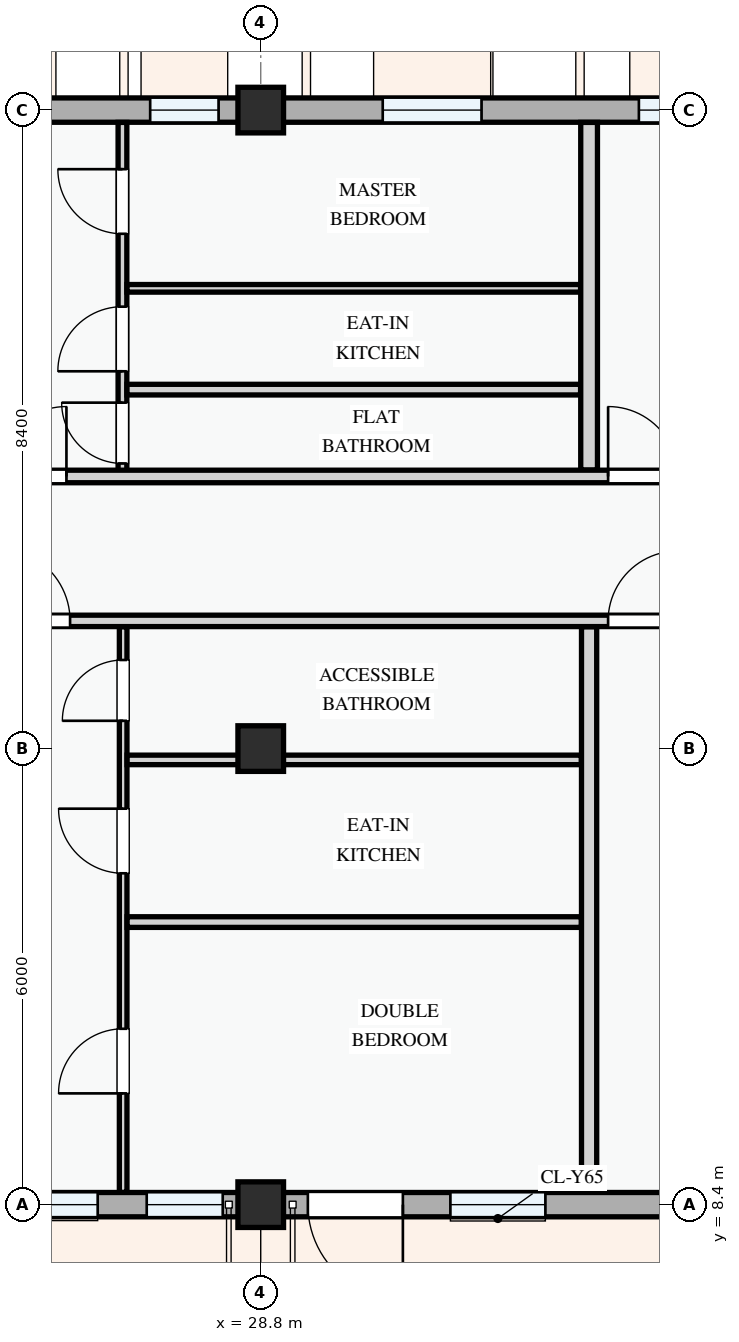
"""IFC4 building model, lengths in metres.
Left out: names, types, materials, properties, quantities, classifications, styles, units other than length and angle.
Written with IfcOpenShell. Run it as: python <this file> out.ifc"""

import sys

from ifc_helpers import new_model, si_unit, direction, frame, frame_2d, origin, origin_2d, place, context, subcontext, project, spatial, rectangle, extrude, element, fill, save


model = new_model("IFC4")
c1 = context("Model", 3, precision=1e-05, world=origin(), true_north=direction((0.0, 1.0)))
c2 = subcontext(c1, "Body", "Model", "MODEL_VIEW")
j1 = project(units=[si_unit("LENGTHUNIT", "METRE"), si_unit("PLANEANGLEUNIT", "RADIAN")], contexts=[c1])
p1 = place(None, origin())
s1 = spatial("IfcSite", under=j1, at=p1, CompositionType="ELEMENT")
p2 = place(p1, origin())
s2 = spatial("IfcBuilding", under=s1, at=p2, CompositionType="ELEMENT")
p3 = place(p2, frame((0.0, 0.0, 14.7)))
s3 = spatial("IfcBuildingStorey", under=s2, at=p3, CompositionType="ELEMENT", Elevation=14.7)
for number, where, z_axis, x_axis in (
    (1, (28.8, 8.4, 0.0), (0.0, 0.0, 1.0), (1.0, 0.0, 0.0)),
    (2, (28.8, 14.4, 0.0), (0.0, 0.0, 1.0), (1.0, 0.0, 0.0)),
    (3, (28.8, 22.8, 0.0), (0.0, 0.0, 1.0), (1.0, 0.0, 0.0)),
):
    element("IfcColumn", number, at=place(p3, frame(where, z_axis=z_axis, x_axis=x_axis)), inside=s3, PredefinedType="COLUMN", context=c2, shape_type="SweptSolid", body=[
        extrude(rectangle(XDim=0.6, YDim=0.6, at=origin_2d()), origin(), (0.0, 0.0, 1.0), 3.3),
    ])
p4 = place(p3, frame((22.8, 8.4, 0.0), z_axis=(0.0, 0.0, 1.0), x_axis=(1.0, 0.0, 0.0)))
e4 = element("IfcWall", 4, at=p4, inside=s3, PredefinedType="STANDARD", context=c2, shape_type="SweptSolid", body=[
    extrude(rectangle(XDim=6.0, YDim=0.32, at=frame_2d((3.0, 0.0))), origin(), (0.0, 0.0, 1.0), 2.475),
])
p5 = place(p4, frame((0.62, 0.0, 0.0)))
e5 = element("IfcOpeningElement", 5, at=p5, cuts=e4, PredefinedType="OPENING", context=c2, shape_type="SweptSolid", body=[
    extrude(rectangle(XDim=1.2, YDim=2.15, at=frame_2d((0.6, 1.075))), frame((0.0, 0.17, 0.0), z_axis=(0.0, -1.0, 0.0), x_axis=(1.0, 0.0, 0.0)), (0.0, 0.0, 1.0), 0.34),
])
p6 = place(p4, frame((2.205, 0.0, 0.78)))
e6 = element("IfcOpeningElement", 6, at=p6, cuts=e4, PredefinedType="OPENING", context=c2, shape_type="SweptSolid", body=[
    extrude(rectangle(XDim=1.65, YDim=1.5, at=frame_2d((0.825, 0.75))), frame((0.0, 0.17, 0.0), z_axis=(0.0, -1.0, 0.0), x_axis=(1.0, 0.0, 0.0)), (0.0, 0.0, 1.0), 0.34),
])
p7 = place(p4, frame((4.5, 0.0, 0.78)))
e7 = element("IfcOpeningElement", 7, at=p7, cuts=e4, PredefinedType="OPENING", context=c2, shape_type="SweptSolid", body=[
    extrude(rectangle(XDim=1.0, YDim=1.25, at=frame_2d((0.5, 0.625))), frame((0.0, 0.17, 0.0), z_axis=(0.0, -1.0, 0.0), x_axis=(1.0, 0.0, 0.0)), (0.0, 0.0, 1.0), 0.34),
])
p8 = place(p3, frame((28.8, 8.4, 0.0), z_axis=(0.0, 0.0, 1.0), x_axis=(1.0, 0.0, 0.0)))
e8 = element("IfcWall", 8, at=p8, inside=s3, PredefinedType="STANDARD", context=c2, shape_type="SweptSolid", body=[
    extrude(rectangle(XDim=8.4, YDim=0.32, at=frame_2d((4.2, 0.0))), origin(), (0.0, 0.0, 1.0), 2.375),
])
p9 = place(p8, frame((0.62, 0.0, 0.0)))
e9 = element("IfcOpeningElement", 9, at=p9, cuts=e8, PredefinedType="OPENING", context=c2, shape_type="SweptSolid", body=[
    extrude(rectangle(XDim=1.25, YDim=2.2, at=frame_2d((0.625, 1.1))), frame((0.0, 0.17, 0.0), z_axis=(0.0, -1.0, 0.0), x_axis=(1.0, 0.0, 0.0)), (0.0, 0.0, 1.0), 0.34),
])
p10 = place(p8, frame((2.495, 0.0, 0.78)))
e10 = element("IfcOpeningElement", 10, at=p10, cuts=e8, PredefinedType="OPENING", context=c2, shape_type="SweptSolid", body=[
    extrude(rectangle(XDim=1.25, YDim=1.3, at=frame_2d((0.625, 0.65))), frame((0.0, 0.17, 0.0), z_axis=(0.0, -1.0, 0.0), x_axis=(1.0, 0.0, 0.0)), (0.0, 0.0, 1.0), 0.34),
])
p11 = place(p8, frame((5.49, 0.0, 0.78)))
e11 = element("IfcOpeningElement", 11, at=p11, cuts=e8, PredefinedType="OPENING", context=c2, shape_type="SweptSolid", body=[
    extrude(rectangle(XDim=1.55, YDim=1.4, at=frame_2d((0.775, 0.7))), frame((0.0, 0.17, 0.0), z_axis=(0.0, -1.0, 0.0), x_axis=(1.0, 0.0, 0.0)), (0.0, 0.0, 1.0), 0.34),
])
p12 = place(p3, frame((37.2, 22.8, 0.0), z_axis=(0.0, 0.0, 1.0), x_axis=(-1.0, 0.0, 0.0)))
e12 = element("IfcWall", 12, at=p12, inside=s3, PredefinedType="STANDARD", context=c2, shape_type="SweptSolid", body=[
    extrude(rectangle(XDim=8.4, YDim=0.32, at=frame_2d((4.2, 0.0))), origin(), (0.0, 0.0, 1.0), 2.375),
])
p13 = place(p12, frame((0.845, 0.0, 0.78)))
e13 = element("IfcOpeningElement", 13, at=p13, cuts=e12, PredefinedType="OPENING", context=c2, shape_type="SweptSolid", body=[
    extrude(rectangle(XDim=2.58, YDim=1.48, at=frame_2d((1.29, 0.74))), frame((0.0, 0.17, 0.0), z_axis=(0.0, -1.0, 0.0), x_axis=(1.0, 0.0, 0.0)), (0.0, 0.0, 1.0), 0.34),
])
p14 = place(p12, frame((5.495, 0.0, 0.78)))
e14 = element("IfcOpeningElement", 14, at=p14, cuts=e12, PredefinedType="OPENING", context=c2, shape_type="SweptSolid", body=[
    extrude(rectangle(XDim=1.3, YDim=1.4, at=frame_2d((0.65, 0.7))), frame((0.0, 0.17, 0.0), z_axis=(0.0, -1.0, 0.0), x_axis=(1.0, 0.0, 0.0)), (0.0, 0.0, 1.0), 0.34),
])
p15 = place(p3, frame((28.8, 22.8, 0.0), z_axis=(0.0, 0.0, 1.0), x_axis=(-1.0, 0.0, 0.0)))
e15 = element("IfcWall", 15, at=p15, inside=s3, PredefinedType="STANDARD", context=c2, shape_type="SweptSolid", body=[
    extrude(rectangle(XDim=6.0, YDim=0.32, at=frame_2d((3.0, 0.0))), origin(), (0.0, 0.0, 1.0), 2.475),
])
p16 = place(p15, frame((0.555, 0.0, 0.78)))
e16 = element("IfcOpeningElement", 16, at=p16, cuts=e15, PredefinedType="OPENING", context=c2, shape_type="SweptSolid", body=[
    extrude(rectangle(XDim=0.9, YDim=1.2, at=frame_2d((0.45, 0.6))), frame((0.0, 0.17, 0.0), z_axis=(0.0, -1.0, 0.0), x_axis=(1.0, 0.0, 0.0)), (0.0, 0.0, 1.0), 0.34),
])
p17 = place(p15, frame((2.815, 0.0, 0.78)))
e17 = element("IfcOpeningElement", 17, at=p17, cuts=e15, PredefinedType="OPENING", context=c2, shape_type="SweptSolid", body=[
    extrude(rectangle(XDim=2.0, YDim=1.5, at=frame_2d((1.0, 0.75))), frame((0.0, 0.17, 0.0), z_axis=(0.0, -1.0, 0.0), x_axis=(1.0, 0.0, 0.0)), (0.0, 0.0, 1.0), 0.34),
])
p18 = place(p3, frame((26.99, 8.562, 0.0), z_axis=(0.0, 0.0, 1.0), x_axis=(0.0, 1.0, 0.0)))
e18 = element("IfcWall", 18, at=p18, inside=s3, PredefinedType="PARTITIONING", context=c2, shape_type="SweptSolid", body=[
    extrude(rectangle(XDim=7.441, YDim=0.1, at=frame_2d((3.72, 0.0))), origin(), (0.0, 0.0, 1.0), 3.0),
])
p19 = place(p18, frame((1.302, 0.0, 0.0)))
e19 = element("IfcOpeningElement", 19, at=p19, cuts=e18, PredefinedType="OPENING", context=c2, shape_type="SweptSolid", body=[
    extrude(rectangle(XDim=0.85, YDim=2.1, at=frame_2d((0.425, 1.05))), frame((0.0, 0.06, 0.0), z_axis=(0.0, -1.0, 0.0), x_axis=(1.0, 0.0, 0.0)), (0.0, 0.0, 1.0), 0.12),
])
p20 = place(p18, frame((4.198, 0.0, 0.0)))
e20 = element("IfcOpeningElement", 20, at=p20, cuts=e18, PredefinedType="OPENING", context=c2, shape_type="SweptSolid", body=[
    extrude(rectangle(XDim=0.85, YDim=2.1, at=frame_2d((0.425, 1.05))), frame((0.0, 0.06, 0.0), z_axis=(0.0, -1.0, 0.0), x_axis=(1.0, 0.0, 0.0)), (0.0, 0.0, 1.0), 0.12),
])
p21 = place(p18, frame((6.204, 0.0, 0.0)))
e21 = element("IfcOpeningElement", 21, at=p21, cuts=e18, PredefinedType="OPENING", context=c2, shape_type="SweptSolid", body=[
    extrude(rectangle(XDim=0.8, YDim=2.1, at=frame_2d((0.4, 1.05))), frame((0.0, 0.06, 0.0), z_axis=(0.0, -1.0, 0.0), x_axis=(1.0, 0.0, 0.0)), (0.0, 0.0, 1.0), 0.12),
])
p22 = place(p3, frame((27.042, 12.118, 0.0), z_axis=(0.0, 0.0, 1.0), x_axis=(1.0, 0.0, 0.0)))
e22 = element("IfcWall", 22, at=p22, inside=s3, PredefinedType="PARTITIONING", context=c2, shape_type="SweptSolid", body=[
    extrude(rectangle(XDim=5.976, YDim=0.14, at=frame_2d((2.988, 0.0))), origin(), (0.0, 0.0, 1.0), 3.0),
])
p23 = place(p3, frame((27.042, 14.251, 0.0), z_axis=(0.0, 0.0, 1.0), x_axis=(1.0, 0.0, 0.0)))
e23 = element("IfcWall", 23, at=p23, inside=s3, PredefinedType="PARTITIONING", context=c2, shape_type="SweptSolid", body=[
    extrude(rectangle(XDim=5.976, YDim=0.125, at=frame_2d((2.988, 0.0))), origin(), (0.0, 0.0, 1.0), 2.375),
])
p24 = place(p3, frame((26.981, 17.98, 0.0), z_axis=(0.0, 0.0, 1.0), x_axis=(0.0, 1.0, 0.0)))
e24 = element("IfcWall", 24, at=p24, inside=s3, PredefinedType="PARTITIONING", context=c2, shape_type="SweptSolid", body=[
    extrude(rectangle(XDim=4.658, YDim=0.115, at=frame_2d((2.329, 0.0))), origin(), (0.0, 0.0, 1.0), 3.0),
])
p25 = place(p24, frame((0.171, 0.0, 0.0)))
e25 = element("IfcOpeningElement", 25, at=p25, cuts=e24, PredefinedType="OPENING", context=c2, shape_type="SweptSolid", body=[
    extrude(rectangle(XDim=0.8, YDim=2.1, at=frame_2d((0.4, 1.05))), frame((0.0, 0.067, 0.0), z_axis=(0.0, -1.0, 0.0), x_axis=(1.0, 0.0, 0.0)), (0.0, 0.0, 1.0), 0.135),
])
p26 = place(p24, frame((1.384, 0.0, 0.0)))
e26 = element("IfcOpeningElement", 26, at=p26, cuts=e24, PredefinedType="OPENING", context=c2, shape_type="SweptSolid", body=[
    extrude(rectangle(XDim=0.85, YDim=2.1, at=frame_2d((0.425, 1.05))), frame((0.0, 0.067, 0.0), z_axis=(0.0, -1.0, 0.0), x_axis=(1.0, 0.0, 0.0)), (0.0, 0.0, 1.0), 0.135),
])
p27 = place(p24, frame((3.193, 0.0, 0.0)))
e27 = element("IfcOpeningElement", 27, at=p27, cuts=e24, PredefinedType="OPENING", context=c2, shape_type="SweptSolid", body=[
    extrude(rectangle(XDim=0.85, YDim=2.1, at=frame_2d((0.425, 1.05))), frame((0.0, 0.067, 0.0), z_axis=(0.0, -1.0, 0.0), x_axis=(1.0, 0.0, 0.0)), (0.0, 0.0, 1.0), 0.135),
])
p28 = place(p3, frame((27.04, 20.455, 0.0), z_axis=(0.0, 0.0, 1.0), x_axis=(1.0, 0.0, 0.0)))
e28 = element("IfcWall", 28, at=p28, inside=s3, PredefinedType="PARTITIONING", context=c2, shape_type="SweptSolid", body=[
    extrude(rectangle(XDim=5.968, YDim=0.1, at=frame_2d((2.984, 0.0))), origin(), (0.0, 0.0, 1.0), 3.0),
])
p29 = place(p3, frame((27.04, 19.122, 0.0), z_axis=(0.0, 0.0, 1.0), x_axis=(1.0, 0.0, 0.0)))
e29 = element("IfcWall", 29, at=p29, inside=s3, PredefinedType="PARTITIONING", context=c2, shape_type="SweptSolid", body=[
    extrude(rectangle(XDim=5.968, YDim=0.14, at=frame_2d((2.984, 0.0))), origin(), (0.0, 0.0, 1.0), 3.0),
])
p30 = place(p3, frame((33.12, 8.562, 0.0), z_axis=(0.0, 0.0, 1.0), x_axis=(0.0, 1.0, 0.0)))
e30 = element("IfcWall", 30, at=p30, inside=s3, PredefinedType="PARTITIONING", context=c2, shape_type="SweptSolid", body=[
    extrude(rectangle(XDim=7.441, YDim=0.2, at=frame_2d((3.72, 0.0))), origin(), (0.0, 0.0, 1.0), 2.585),
])
p31 = place(p3, frame((33.12, 18.064, 0.0), z_axis=(0.0, 0.0, 1.0), x_axis=(0.0, 1.0, 0.0)))
e31 = element("IfcWall", 31, at=p31, inside=s3, PredefinedType="PARTITIONING", context=c2, shape_type="SweptSolid", body=[
    extrude(rectangle(XDim=4.573, YDim=0.22, at=frame_2d((2.287, 0.0))), origin(), (0.0, 0.0, 1.0), 2.585),
])
p32 = place(p3, frame((22.66, 16.08, 0.0), z_axis=(0.0, 0.0, 1.0), x_axis=(1.0, 0.0, 0.0)))
e32 = element("IfcWall", 32, at=p32, inside=s3, PredefinedType="PARTITIONING", context=c2, shape_type="SweptSolid", body=[
    extrude(rectangle(XDim=34.778, YDim=0.15, at=frame_2d((17.389, 0.0))), origin(), (0.0, 0.0, 1.0), 3.0),
])
p33 = place(p32, frame((2.672, 0.0, 0.0)))
e33 = element("IfcOpeningElement", 33, at=p33, cuts=e32, PredefinedType="OPENING", context=c2, shape_type="SweptSolid", body=[
    extrude(rectangle(XDim=0.96, YDim=2.12, at=frame_2d((0.48, 1.06))), frame((0.0, 0.085, 0.0), z_axis=(0.0, -1.0, 0.0), x_axis=(1.0, 0.0, 0.0)), (0.0, 0.0, 1.0), 0.17),
])
p34 = place(p32, frame((10.71, 0.0, 0.0)))
e34 = element("IfcOpeningElement", 34, at=p34, cuts=e32, PredefinedType="OPENING", context=c2, shape_type="SweptSolid", body=[
    extrude(rectangle(XDim=0.92, YDim=2.1, at=frame_2d((0.46, 1.05))), frame((0.0, 0.085, 0.0), z_axis=(0.0, -1.0, 0.0), x_axis=(1.0, 0.0, 0.0)), (0.0, 0.0, 1.0), 0.17),
])
p35 = place(p32, frame((24.28, 0.0, 0.0)))
e35 = element("IfcOpeningElement", 35, at=p35, cuts=e32, PredefinedType="OPENING", context=c2, shape_type="SweptSolid", body=[
    extrude(rectangle(XDim=0.92, YDim=2.1, at=frame_2d((0.46, 1.05))), frame((0.0, 0.085, 0.0), z_axis=(0.0, -1.0, 0.0), x_axis=(1.0, 0.0, 0.0)), (0.0, 0.0, 1.0), 0.17),
])
p36 = place(p3, frame((22.66, 17.98, 0.0), z_axis=(0.0, 0.0, 1.0), x_axis=(1.0, 0.0, 0.0)))
e36 = element("IfcWall", 36, at=p36, inside=s3, PredefinedType="PARTITIONING", context=c2, shape_type="SweptSolid", body=[
    extrude(rectangle(XDim=34.778, YDim=0.165, at=frame_2d((17.389, 0.0))), origin(), (0.0, 0.0, 1.0), 3.0),
])
p37 = place(p36, frame((2.664, 0.0, 0.0)))
e37 = element("IfcOpeningElement", 37, at=p37, cuts=e36, PredefinedType="OPENING", context=c2, shape_type="SweptSolid", body=[
    extrude(rectangle(XDim=0.92, YDim=2.1, at=frame_2d((0.46, 1.05))), frame((0.0, 0.093, 0.0), z_axis=(0.0, -1.0, 0.0), x_axis=(1.0, 0.0, 0.0)), (0.0, 0.0, 1.0), 0.185),
])
p38 = place(p36, frame((10.71, 0.0, 0.0)))
e38 = element("IfcOpeningElement", 38, at=p38, cuts=e36, PredefinedType="OPENING", context=c2, shape_type="SweptSolid", body=[
    extrude(rectangle(XDim=0.92, YDim=2.1, at=frame_2d((0.46, 1.05))), frame((0.0, 0.093, 0.0), z_axis=(0.0, -1.0, 0.0), x_axis=(1.0, 0.0, 0.0)), (0.0, 0.0, 1.0), 0.185),
])
p39 = place(p36, frame((24.254, 0.0, 0.0)))
e39 = element("IfcOpeningElement", 39, at=p39, cuts=e36, PredefinedType="OPENING", context=c2, shape_type="SweptSolid", body=[
    extrude(rectangle(XDim=0.96, YDim=2.12, at=frame_2d((0.48, 1.06))), frame((0.0, 0.093, 0.0), z_axis=(0.0, -1.0, 0.0), x_axis=(1.0, 0.0, 0.0)), (0.0, 0.0, 1.0), 0.185),
])
p40 = place(p6, origin())
e40 = element("IfcWindow", 40, at=p40, inside=s3, PartitioningType="DOUBLE_PANEL_VERTICAL", PredefinedType="WINDOW", context=c2, shape_type="SweptSolid", body=[
    extrude(rectangle(XDim=1.65, YDim=1.5, at=frame_2d((0.825, 0.75))), frame((0.0, 0.03, 0.0), z_axis=(0.0, -1.0, 0.0), x_axis=(1.0, 0.0, 0.0)), (0.0, 0.0, 1.0), 0.06),
])
fill(e6, e40)
p41 = place(p7, origin())
e41 = element("IfcWindow", 41, at=p41, inside=s3, PartitioningType="SINGLE_PANEL", PredefinedType="WINDOW", context=c2, shape_type="SweptSolid", body=[
    extrude(rectangle(XDim=1.0, YDim=1.25, at=frame_2d((0.5, 0.625))), frame((0.0, 0.03, 0.0), z_axis=(0.0, -1.0, 0.0), x_axis=(1.0, 0.0, 0.0)), (0.0, 0.0, 1.0), 0.06),
])
fill(e7, e41)
p42 = place(p9, frame((1.25, 0.0, 0.0), z_axis=(0.0, 0.0, 1.0), x_axis=(-1.0, 0.0, 0.0)))
e42 = element("IfcDoor", 42, at=p42, inside=s3, OperationType="SINGLE_SWING_LEFT", PredefinedType="DOOR", context=c2, shape_type="SweptSolid", body=[
    extrude(rectangle(XDim=1.25, YDim=2.2, at=frame_2d((0.625, 1.1))), frame((0.0, 0.025, 0.0), z_axis=(0.0, -1.0, 0.0), x_axis=(1.0, 0.0, 0.0)), (0.0, 0.0, 1.0), 0.05),
])
fill(e9, e42)
p43 = place(p10, origin())
e43 = element("IfcWindow", 43, at=p43, inside=s3, PartitioningType="SINGLE_PANEL", PredefinedType="WINDOW", context=c2, shape_type="SweptSolid", body=[
    extrude(rectangle(XDim=1.25, YDim=1.3, at=frame_2d((0.625, 0.65))), frame((0.0, 0.03, 0.0), z_axis=(0.0, -1.0, 0.0), x_axis=(1.0, 0.0, 0.0)), (0.0, 0.0, 1.0), 0.06),
])
fill(e10, e43)
p44 = place(p13, origin())
e44 = element("IfcWindow", 44, at=p44, inside=s3, PartitioningType="DOUBLE_PANEL_VERTICAL", PredefinedType="WINDOW", context=c2, shape_type="SweptSolid", body=[
    extrude(rectangle(XDim=2.58, YDim=1.48, at=frame_2d((1.29, 0.74))), frame((0.0, 0.03, 0.0), z_axis=(0.0, -1.0, 0.0), x_axis=(1.0, 0.0, 0.0)), (0.0, 0.0, 1.0), 0.06),
])
fill(e13, e44)
p45 = place(p14, origin())
e45 = element("IfcWindow", 45, at=p45, inside=s3, PartitioningType="SINGLE_PANEL", PredefinedType="WINDOW", context=c2, shape_type="SweptSolid", body=[
    extrude(rectangle(XDim=1.3, YDim=1.4, at=frame_2d((0.65, 0.7))), frame((0.0, 0.03, 0.0), z_axis=(0.0, -1.0, 0.0), x_axis=(1.0, 0.0, 0.0)), (0.0, 0.0, 1.0), 0.06),
])
fill(e14, e45)
p46 = place(p16, origin())
e46 = element("IfcWindow", 46, at=p46, inside=s3, PartitioningType="SINGLE_PANEL", PredefinedType="WINDOW", context=c2, shape_type="SweptSolid", body=[
    extrude(rectangle(XDim=0.9, YDim=1.2, at=frame_2d((0.45, 0.6))), frame((0.0, 0.03, 0.0), z_axis=(0.0, -1.0, 0.0), x_axis=(1.0, 0.0, 0.0)), (0.0, 0.0, 1.0), 0.06),
])
fill(e16, e46)
p47 = place(p19, origin())
e47 = element("IfcDoor", 47, at=p47, inside=s3, OperationType="SINGLE_SWING_LEFT", PredefinedType="DOOR", context=c2, shape_type="SweptSolid", body=[
    extrude(rectangle(XDim=0.85, YDim=2.1, at=frame_2d((0.425, 1.05))), frame((0.0, 0.025, 0.0), z_axis=(0.0, -1.0, 0.0), x_axis=(1.0, 0.0, 0.0)), (0.0, 0.0, 1.0), 0.05),
])
fill(e19, e47)
p48 = place(p20, origin())
e48 = element("IfcDoor", 48, at=p48, inside=s3, OperationType="SINGLE_SWING_RIGHT", PredefinedType="DOOR", context=c2, shape_type="SweptSolid", body=[
    extrude(rectangle(XDim=0.85, YDim=2.1, at=frame_2d((0.425, 1.05))), frame((0.0, 0.025, 0.0), z_axis=(0.0, -1.0, 0.0), x_axis=(1.0, 0.0, 0.0)), (0.0, 0.0, 1.0), 0.05),
])
fill(e20, e48)
p49 = place(p21, origin())
e49 = element("IfcDoor", 49, at=p49, inside=s3, OperationType="SINGLE_SWING_LEFT", PredefinedType="DOOR", context=c2, shape_type="SweptSolid", body=[
    extrude(rectangle(XDim=0.8, YDim=2.1, at=frame_2d((0.4, 1.05))), frame((0.0, 0.025, 0.0), z_axis=(0.0, -1.0, 0.0), x_axis=(1.0, 0.0, 0.0)), (0.0, 0.0, 1.0), 0.05),
])
fill(e21, e49)
p50 = place(p25, origin())
e50 = element("IfcDoor", 50, at=p50, inside=s3, OperationType="SINGLE_SWING_RIGHT", PredefinedType="DOOR", context=c2, shape_type="SweptSolid", body=[
    extrude(rectangle(XDim=0.8, YDim=2.1, at=frame_2d((0.4, 1.05))), frame((0.0, 0.025, 0.0), z_axis=(0.0, -1.0, 0.0), x_axis=(1.0, 0.0, 0.0)), (0.0, 0.0, 1.0), 0.05),
])
fill(e25, e50)
p51 = place(p26, origin())
e51 = element("IfcDoor", 51, at=p51, inside=s3, OperationType="SINGLE_SWING_LEFT", PredefinedType="DOOR", context=c2, shape_type="SweptSolid", body=[
    extrude(rectangle(XDim=0.85, YDim=2.1, at=frame_2d((0.425, 1.05))), frame((0.0, 0.025, 0.0), z_axis=(0.0, -1.0, 0.0), x_axis=(1.0, 0.0, 0.0)), (0.0, 0.0, 1.0), 0.05),
])
fill(e26, e51)
p52 = place(p27, origin())
e52 = element("IfcDoor", 52, at=p52, inside=s3, OperationType="SINGLE_SWING_RIGHT", PredefinedType="DOOR", context=c2, shape_type="SweptSolid", body=[
    extrude(rectangle(XDim=0.85, YDim=2.1, at=frame_2d((0.425, 1.05))), frame((0.0, 0.025, 0.0), z_axis=(0.0, -1.0, 0.0), x_axis=(1.0, 0.0, 0.0)), (0.0, 0.0, 1.0), 0.05),
])
fill(e27, e52)
p53 = place(p33, origin())
e53 = element("IfcDoor", 53, at=p53, inside=s3, OperationType="SINGLE_SWING_LEFT", PredefinedType="DOOR", context=c2, shape_type="SweptSolid", body=[
    extrude(rectangle(XDim=0.96, YDim=2.12, at=frame_2d((0.48, 1.06))), frame((0.0, 0.025, 0.0), z_axis=(0.0, -1.0, 0.0), x_axis=(1.0, 0.0, 0.0)), (0.0, 0.0, 1.0), 0.05),
])
fill(e33, e53)
p54 = place(p34, origin())
e54 = element("IfcDoor", 54, at=p54, inside=s3, OperationType="SINGLE_SWING_RIGHT", PredefinedType="DOOR", context=c2, shape_type="SweptSolid", body=[
    extrude(rectangle(XDim=0.92, YDim=2.1, at=frame_2d((0.46, 1.05))), frame((0.0, 0.025, 0.0), z_axis=(0.0, -1.0, 0.0), x_axis=(1.0, 0.0, 0.0)), (0.0, 0.0, 1.0), 0.05),
])
fill(e34, e54)
p55 = place(p37, origin())
e55 = element("IfcDoor", 55, at=p55, inside=s3, OperationType="SINGLE_SWING_RIGHT", PredefinedType="DOOR", context=c2, shape_type="SweptSolid", body=[
    extrude(rectangle(XDim=0.92, YDim=2.1, at=frame_2d((0.46, 1.05))), frame((0.0, 0.025, 0.0), z_axis=(0.0, -1.0, 0.0), x_axis=(1.0, 0.0, 0.0)), (0.0, 0.0, 1.0), 0.05),
])
fill(e37, e55)
p56 = place(p38, origin())
e56 = element("IfcDoor", 56, at=p56, inside=s3, OperationType="SINGLE_SWING_LEFT", PredefinedType="DOOR", context=c2, shape_type="SweptSolid", body=[
    extrude(rectangle(XDim=0.92, YDim=2.1, at=frame_2d((0.46, 1.05))), frame((0.0, 0.025, 0.0), z_axis=(0.0, -1.0, 0.0), x_axis=(1.0, 0.0, 0.0)), (0.0, 0.0, 1.0), 0.05),
])
fill(e38, e56)
save(model, sys.argv[1])
